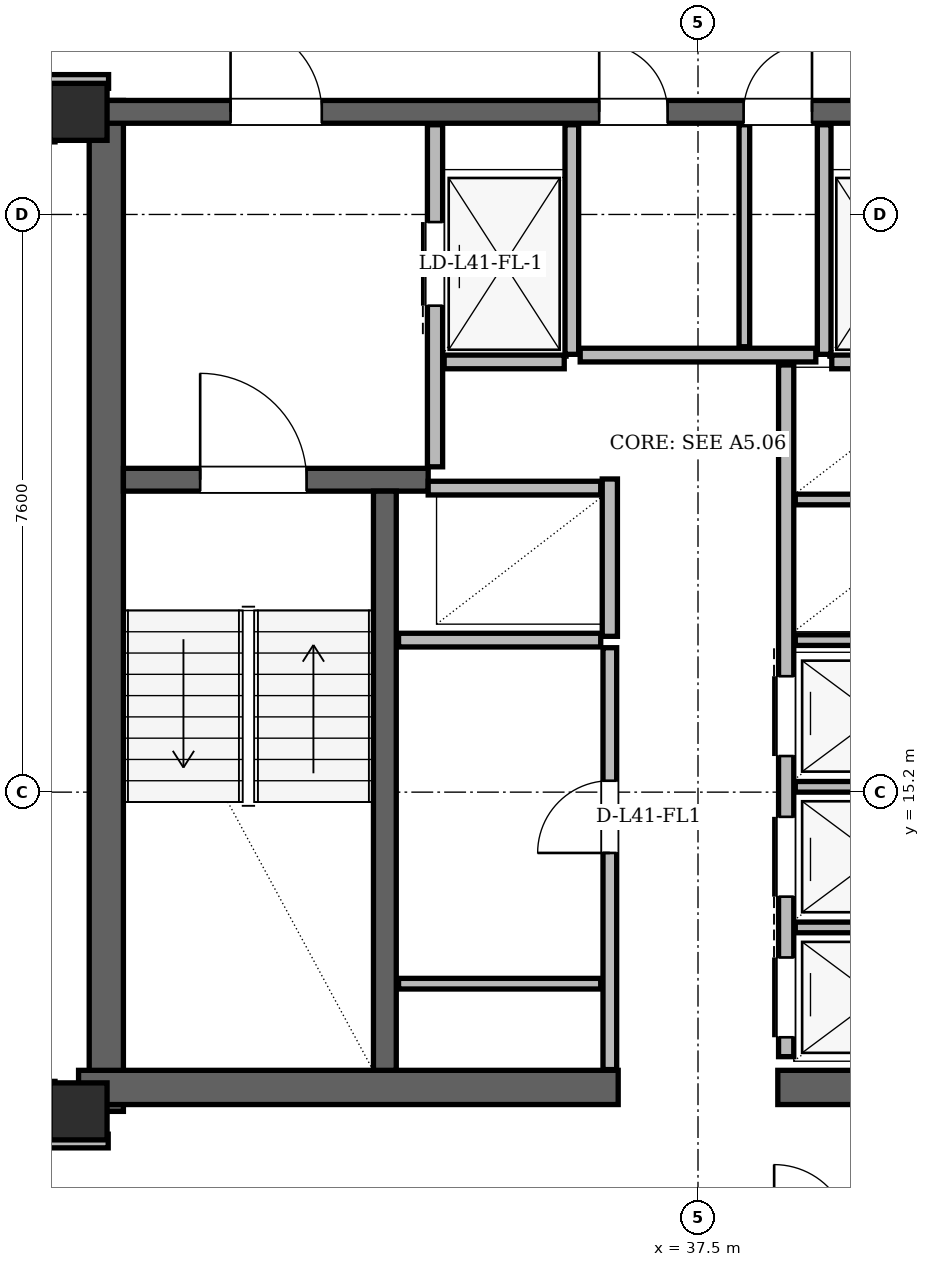
"""IFC4 building model, lengths in metres.
Left out: names, types, materials, properties, quantities, classifications, styles, units other than length and angle.
Written with IfcOpenShell. Run it as: python <this file> out.ifc"""

import sys

from ifc_helpers import new_model, si_unit, direction, frame, frame_2d, origin, origin_2d, place, context, subcontext, project, spatial, rectangle, hollow_rectangle, extrude, element, fill, save


model = new_model("IFC4")
c1 = context("Model", 3, precision=1e-05, world=origin(), true_north=direction((0.0, 1.0)))
c2 = subcontext(c1, "Body", "Model", "MODEL_VIEW")
j1 = project(units=[si_unit("LENGTHUNIT", "METRE"), si_unit("PLANEANGLEUNIT", "RADIAN")], contexts=[c1])
p1 = place(None, origin())
s1 = spatial("IfcSite", under=j1, at=p1, CompositionType="ELEMENT")
p2 = place(p1, origin())
s2 = spatial("IfcBuilding", under=s1, at=p2, CompositionType="ELEMENT")
p3 = place(p2, frame((0.0, 0.0, 156.6)))
s3 = spatial("IfcBuildingStorey", under=s2, at=p3, CompositionType="ELEMENT", Elevation=156.6)
for number, where, z_axis, x_axis in (
    (1, (29.35, 11.0, 0.0), (0.0, 0.0, 1.0), (1.0, 0.0, 0.0)),
    (2, (29.35, 24.15, 0.0), (0.0, 0.0, 1.0), (1.0, 0.0, 0.0)),
):
    element("IfcColumn", number, at=place(p3, frame(where, z_axis=z_axis, x_axis=x_axis)), inside=s3, PredefinedType="COLUMN", context=c2, shape_type="SweptSolid", body=[
        extrude(hollow_rectangle(XDim=0.75, YDim=0.75, WallThickness=0.06, at=origin_2d()), origin(), (0.0, 0.0, 1.0), 3.6),
    ])
p4 = place(p3, frame((29.715, 11.0, 0.0), z_axis=(0.0, 0.0, 1.0), x_axis=(0.0, 1.0, 0.0)))
e3 = element("IfcWall", 3, at=p4, inside=s3, PredefinedType="SHEAR", context=c2, shape_type="SweptSolid", body=[
    extrude(rectangle(XDim=13.3, YDim=0.45, at=frame_2d((6.65, 0.0))), origin(), (0.0, 0.0, 1.0), 3.38),
])
for number, where, z_axis, x_axis in (
    (4, (29.35, 11.315, 0.0), (0.0, 0.0, 1.0), (1.0, 0.0, 0.0)),
    (5, (38.55, 11.315, 0.0), (0.0, 0.0, 1.0), (1.0, 0.0, 0.0)),
):
    element("IfcWall", number, at=place(p3, frame(where, z_axis=z_axis, x_axis=x_axis)), inside=s3, PredefinedType="SHEAR", context=c2, shape_type="SweptSolid", body=[
        extrude(rectangle(XDim=7.1, YDim=0.45, at=frame_2d((3.55, 0.0))), origin(), (0.0, 0.0, 1.0), 3.38),
    ])
p5 = place(p3, frame((29.65, 24.15, 0.0), z_axis=(0.0, 0.0, 1.0), x_axis=(1.0, 0.0, 0.0)))
e6 = element("IfcWall", 6, at=p5, inside=s3, PredefinedType="SHEAR", context=c2, shape_type="SweptSolid", body=[
    extrude(rectangle(XDim=15.7, YDim=0.3, at=frame_2d((7.85, 0.0))), origin(), (0.0, 0.0, 1.0), 3.38),
])
p6 = place(p5, frame((1.7, 0.0, 0.0)))
e7 = element("IfcOpeningElement", 7, at=p6, cuts=e6, PredefinedType="OPENING", context=c2, shape_type="SweptSolid", body=[
    extrude(rectangle(XDim=1.2, YDim=2.2, at=frame_2d((0.6, 1.1))), frame((0.0, 0.15, 0.0), z_axis=(0.0, -1.0, 0.0), x_axis=(1.0, 0.0, 0.0)), (0.0, 0.0, 1.0), 0.3),
])
p7 = place(p5, frame((12.8, 0.0, 0.0)))
e8 = element("IfcOpeningElement", 8, at=p7, cuts=e6, PredefinedType="OPENING", context=c2, shape_type="SweptSolid", body=[
    extrude(rectangle(XDim=1.2, YDim=2.2, at=frame_2d((0.6, 1.1))), frame((0.0, 0.15, 0.0), z_axis=(0.0, -1.0, 0.0), x_axis=(1.0, 0.0, 0.0)), (0.0, 0.0, 1.0), 0.3),
])
p8 = place(p5, frame((6.55, 0.0, 0.0)))
e9 = element("IfcOpeningElement", 9, at=p8, cuts=e6, PredefinedType="OPENING", context=c2, shape_type="SweptSolid", body=[
    extrude(rectangle(XDim=0.9, YDim=2.05, at=frame_2d((0.45, 1.025))), frame((0.0, 0.15, 0.0), z_axis=(0.0, -1.0, 0.0), x_axis=(1.0, 0.0, 0.0)), (0.0, 0.0, 1.0), 0.3),
])
p9 = place(p5, frame((8.45, 0.0, 0.0)))
e10 = element("IfcOpeningElement", 10, at=p9, cuts=e6, PredefinedType="OPENING", context=c2, shape_type="SweptSolid", body=[
    extrude(rectangle(XDim=0.9, YDim=2.05, at=frame_2d((0.45, 1.025))), frame((0.0, 0.15, 0.0), z_axis=(0.0, -1.0, 0.0), x_axis=(1.0, 0.0, 0.0)), (0.0, 0.0, 1.0), 0.3),
])
p10 = place(p3, frame((29.94, 19.31, 0.0), z_axis=(0.0, 0.0, 1.0), x_axis=(1.0, 0.0, 0.0)))
e11 = element("IfcWall", 11, at=p10, inside=s3, PredefinedType="SHEAR", context=c2, shape_type="SweptSolid", body=[
    extrude(rectangle(XDim=4.01, YDim=0.3, at=frame_2d((2.005, 0.0))), origin(), (0.0, 0.0, 1.0), 3.38),
])
p11 = place(p10, frame((1.01, 0.0, 0.0)))
e12 = element("IfcOpeningElement", 12, at=p11, cuts=e11, PredefinedType="OPENING", context=c2, shape_type="SweptSolid", body=[
    extrude(rectangle(XDim=1.4, YDim=2.2, at=frame_2d((0.7, 1.1))), frame((0.0, 0.15, 0.0), z_axis=(0.0, -1.0, 0.0), x_axis=(1.0, 0.0, 0.0)), (0.0, 0.0, 1.0), 0.3),
])
p12 = place(p3, frame((33.38, 11.54, 0.0), z_axis=(0.0, 0.0, 1.0), x_axis=(0.0, 1.0, 0.0)))
e13 = element("IfcWall", 13, at=p12, inside=s3, PredefinedType="SHEAR", context=c2, shape_type="SweptSolid", body=[
    extrude(rectangle(XDim=7.62, YDim=0.3, at=frame_2d((3.81, 0.0))), origin(), (0.0, 0.0, 1.0), 3.38),
])
p13 = place(p3, frame((32.901, 43.313, 0.0), z_axis=(0.0, 0.0, 1.0), x_axis=(-0.499998839087, -0.866026074037, 0.0)))
e14 = element("IfcWall", 14, at=p13, inside=s3, PredefinedType="SOLIDWALL", context=c2, shape_type="SweptSolid", body=[
    extrude(rectangle(XDim=35.606, YDim=0.34, at=frame_2d((17.803, 0.0))), origin(), (0.0, 0.0, 1.0), 2.6),
])
p14 = place(p13, frame((8.034, 0.0, 0.0)))
e15 = element("IfcOpeningElement", 15, at=p14, cuts=e14, PredefinedType="OPENING", context=c2, shape_type="SweptSolid", body=[
    extrude(rectangle(XDim=1.5, YDim=2.2, at=frame_2d((0.75, 1.1))), frame((0.0, 0.17, 0.0), z_axis=(0.0, -1.0, 0.0), x_axis=(1.0, 0.0, 0.0)), (0.0, 0.0, 1.0), 0.34),
])
p15 = place(p13, frame((30.887, 0.0, 0.0)))
e16 = element("IfcOpeningElement", 16, at=p15, cuts=e14, PredefinedType="OPENING", context=c2, shape_type="SweptSolid", body=[
    extrude(rectangle(XDim=1.5, YDim=2.2, at=frame_2d((0.75, 1.1))), frame((0.0, 0.17, 0.0), z_axis=(0.0, -1.0, 0.0), x_axis=(1.0, 0.0, 0.0)), (0.0, 0.0, 1.0), 0.34),
])
p16 = place(p13, frame((33.096, 0.0, 0.85)))
e17 = element("IfcOpeningElement", 17, at=p16, cuts=e14, PredefinedType="OPENING", context=c2, shape_type="SweptSolid", body=[
    extrude(rectangle(XDim=1.2, YDim=1.48, at=frame_2d((0.6, 0.74))), frame((0.0, 0.17, 0.0), z_axis=(0.0, -1.0, 0.0), x_axis=(1.0, 0.0, 0.0)), (0.0, 0.0, 1.0), 0.34),
])
p17 = place(p13, frame((13.168, 0.0, 0.85)))
e18 = element("IfcOpeningElement", 18, at=p17, cuts=e14, PredefinedType="OPENING", context=c2, shape_type="SweptSolid", body=[
    extrude(rectangle(XDim=1.2, YDim=1.48, at=frame_2d((0.6, 0.74))), frame((0.0, 0.17, 0.0), z_axis=(0.0, -1.0, 0.0), x_axis=(1.0, 0.0, 0.0)), (0.0, 0.0, 1.0), 0.34),
])
p18 = place(p13, frame((20.876, 0.0, 0.85)))
e19 = element("IfcOpeningElement", 19, at=p18, cuts=e14, PredefinedType="OPENING", context=c2, shape_type="SweptSolid", body=[
    extrude(rectangle(XDim=2.8, YDim=1.64, at=frame_2d((1.4, 0.82))), frame((0.0, 0.17, 0.0), z_axis=(0.0, -1.0, 0.0), x_axis=(1.0, 0.0, 0.0)), (0.0, 0.0, 1.0), 0.34),
])
p19 = place(p13, frame((2.906, 0.0, 0.85)))
e20 = element("IfcOpeningElement", 20, at=p19, cuts=e14, PredefinedType="OPENING", context=c2, shape_type="SweptSolid", body=[
    extrude(rectangle(XDim=1.6, YDim=1.64, at=frame_2d((0.8, 0.82))), frame((0.0, 0.17, 0.0), z_axis=(0.0, -1.0, 0.0), x_axis=(1.0, 0.0, 0.0)), (0.0, 0.0, 1.0), 0.34),
])
p20 = place(p3, frame((34.04, 19.48, 0.0), z_axis=(0.0, 0.0, 1.0), x_axis=(0.0, 1.0, 0.0)))
e21 = element("IfcWall", 21, at=p20, inside=s3, PredefinedType="PARTITIONING", context=c2, shape_type="SweptSolid", body=[
    extrude(rectangle(XDim=4.5, YDim=0.2, at=frame_2d((2.25, 0.0))), origin(), (0.0, 0.0, 1.0), 2.42),
])
p21 = place(p20, frame((2.12, 0.0, 0.0)))
e22 = element("IfcOpeningElement", 22, at=p21, cuts=e21, PredefinedType="OPENING", context=c2, shape_type="SweptSolid", body=[
    extrude(rectangle(XDim=1.1, YDim=2.2, at=frame_2d((0.55, 1.1))), frame((0.0, 0.1, 0.0), z_axis=(0.0, -1.0, 0.0), x_axis=(1.0, 0.0, 0.0)), (0.0, 0.0, 1.0), 0.2),
])
p22 = place(p3, frame((35.84, 20.96, 0.0), z_axis=(0.0, 0.0, 1.0), x_axis=(0.0, 1.0, 0.0)))
e23 = element("IfcWall", 23, at=p22, inside=s3, PredefinedType="PARTITIONING", context=c2, shape_type="SweptSolid", body=[
    extrude(rectangle(XDim=3.02, YDim=0.18, at=frame_2d((1.51, 0.0))), origin(), (0.0, 0.0, 1.0), 2.42),
])
p23 = place(p3, frame((34.16, 20.86, 0.0), z_axis=(0.0, 0.0, 1.0), x_axis=(1.0, 0.0, 0.0)))
e24 = element("IfcWall", 24, at=p23, inside=s3, PredefinedType="PARTITIONING", context=c2, shape_type="SweptSolid", body=[
    extrude(rectangle(XDim=1.58, YDim=0.18, at=frame_2d((0.79, 0.0))), origin(), (0.0, 0.0, 1.0), 3.38),
])
p24 = place(p3, frame((39.16, 20.96, 0.0), z_axis=(0.0, 0.0, 1.0), x_axis=(0.0, 1.0, 0.0)))
e25 = element("IfcWall", 25, at=p24, inside=s3, PredefinedType="PARTITIONING", context=c2, shape_type="SweptSolid", body=[
    extrude(rectangle(XDim=3.02, YDim=0.18, at=frame_2d((1.51, 0.0))), origin(), (0.0, 0.0, 1.0), 2.42),
])
p25 = place(p3, frame((39.26, 20.86, 0.0), z_axis=(0.0, 0.0, 1.0), x_axis=(1.0, 0.0, 0.0)))
e26 = element("IfcWall", 26, at=p25, inside=s3, PredefinedType="PARTITIONING", context=c2, shape_type="SweptSolid", body=[
    extrude(rectangle(XDim=1.58, YDim=0.18, at=frame_2d((0.79, 0.0))), origin(), (0.0, 0.0, 1.0), 3.38),
])
p26 = place(p3, frame((36.34, 17.25, 0.0), z_axis=(0.0, 0.0, 1.0), x_axis=(0.0, 1.0, 0.0)))
e27 = element("IfcWall", 27, at=p26, inside=s3, PredefinedType="PARTITIONING", context=c2, shape_type="SweptSolid", body=[
    extrude(rectangle(XDim=2.07, YDim=0.2, at=frame_2d((1.035, 0.0))), origin(), (0.0, 0.0, 1.0), 3.38),
])
p27 = place(p3, frame((33.95, 19.2, 0.0), z_axis=(0.0, 0.0, 1.0), x_axis=(1.0, 0.0, 0.0)))
e28 = element("IfcWall", 28, at=p27, inside=s3, PredefinedType="PARTITIONING", context=c2, shape_type="SweptSolid", body=[
    extrude(rectangle(XDim=2.27, YDim=0.18, at=frame_2d((1.135, 0.0))), origin(), (0.0, 0.0, 1.0), 3.38),
])
p28 = place(p3, frame((33.56, 17.2, 0.0), z_axis=(0.0, 0.0, 1.0), x_axis=(1.0, 0.0, 0.0)))
e29 = element("IfcWall", 29, at=p28, inside=s3, PredefinedType="PARTITIONING", context=c2, shape_type="SweptSolid", body=[
    extrude(rectangle(XDim=2.66, YDim=0.18, at=frame_2d((1.33, 0.0))), origin(), (0.0, 0.0, 1.0), 3.38),
])
p29 = place(p3, frame((36.34, 11.55, 0.0), z_axis=(0.0, 0.0, 1.0), x_axis=(0.0, 1.0, 0.0)))
e30 = element("IfcWall", 30, at=p29, inside=s3, PredefinedType="PARTITIONING", context=c2, shape_type="SweptSolid", body=[
    extrude(rectangle(XDim=5.55, YDim=0.18, at=frame_2d((2.775, 0.0))), origin(), (0.0, 0.0, 1.0), 3.38),
])
p30 = place(p29, frame((2.85, 0.0, 0.0)))
e31 = element("IfcOpeningElement", 31, at=p30, cuts=e30, PredefinedType="OPENING", context=c2, shape_type="SweptSolid", body=[
    extrude(rectangle(XDim=0.95, YDim=2.1, at=frame_2d((0.475, 1.05))), frame((0.0, 0.09, 0.0), z_axis=(0.0, -1.0, 0.0), x_axis=(1.0, 0.0, 0.0)), (0.0, 0.0, 1.0), 0.18),
])
p31 = place(p3, frame((33.56, 12.68, 0.0), z_axis=(0.0, 0.0, 1.0), x_axis=(1.0, 0.0, 0.0)))
e32 = element("IfcWall", 32, at=p31, inside=s3, PredefinedType="PARTITIONING", context=c2, shape_type="SweptSolid", body=[
    extrude(rectangle(XDim=2.66, YDim=0.14, at=frame_2d((1.33, 0.0))), origin(), (0.0, 0.0, 1.0), 3.38),
])
p32 = place(p3, frame((38.66, 11.72, 0.0), z_axis=(0.0, 0.0, 1.0), x_axis=(0.0, 1.0, 0.0)))
e33 = element("IfcWall", 33, at=p32, inside=s3, PredefinedType="PARTITIONING", context=c2, shape_type="SweptSolid", body=[
    extrude(rectangle(XDim=9.1, YDim=0.2, at=frame_2d((4.55, 0.0))), origin(), (0.0, 0.0, 1.0), 3.38),
])
p33 = place(p32, frame((0.255, 0.0, 0.0)))
e34 = element("IfcOpeningElement", 34, at=p33, cuts=e33, PredefinedType="OPENING", context=c2, shape_type="SweptSolid", body=[
    extrude(rectangle(XDim=1.05, YDim=2.15, at=frame_2d((0.525, 1.075))), frame((0.0, 0.1, 0.0), z_axis=(0.0, -1.0, 0.0), x_axis=(1.0, 0.0, 0.0)), (0.0, 0.0, 1.0), 0.2),
])
p34 = place(p32, frame((2.105, 0.0, 0.0)))
e35 = element("IfcOpeningElement", 35, at=p34, cuts=e33, PredefinedType="OPENING", context=c2, shape_type="SweptSolid", body=[
    extrude(rectangle(XDim=1.05, YDim=2.15, at=frame_2d((0.525, 1.075))), frame((0.0, 0.1, 0.0), z_axis=(0.0, -1.0, 0.0), x_axis=(1.0, 0.0, 0.0)), (0.0, 0.0, 1.0), 0.2),
])
p35 = place(p32, frame((3.955, 0.0, 0.0)))
e36 = element("IfcOpeningElement", 36, at=p35, cuts=e33, PredefinedType="OPENING", context=c2, shape_type="SweptSolid", body=[
    extrude(rectangle(XDim=1.05, YDim=2.15, at=frame_2d((0.525, 1.075))), frame((0.0, 0.1, 0.0), z_axis=(0.0, -1.0, 0.0), x_axis=(1.0, 0.0, 0.0)), (0.0, 0.0, 1.0), 0.2),
])
for number, where, z_axis, x_axis in (
    (37, (38.78, 13.42, 0.0), (0.0, 0.0, 1.0), (1.0, 0.0, 0.0)),
    (38, (38.78, 15.27, 0.0), (0.0, 0.0, 1.0), (1.0, 0.0, 0.0)),
    (39, (38.78, 17.2, 0.0), (0.0, 0.0, 1.0), (1.0, 0.0, 0.0)),
    (40, (38.78, 19.05, 0.0), (0.0, 0.0, 1.0), (1.0, 0.0, 0.0)),
):
    element("IfcWall", number, at=place(p3, frame(where, z_axis=z_axis, x_axis=x_axis)), inside=s3, PredefinedType="PARTITIONING", context=c2, shape_type="SweptSolid", body=[
        extrude(rectangle(XDim=2.66, YDim=0.14, at=frame_2d((1.33, 0.0))), origin(), (0.0, 0.0, 1.0), 3.38),
    ])
p36 = place(p3, frame((35.95, 20.95, 0.0), z_axis=(0.0, 0.0, 1.0), x_axis=(1.0, 0.0, 0.0)))
e41 = element("IfcWall", 41, at=p36, inside=s3, PredefinedType="PARTITIONING", context=c2, shape_type="SweptSolid", body=[
    extrude(rectangle(XDim=3.1, YDim=0.18, at=frame_2d((1.55, 0.0))), origin(), (0.0, 0.0, 1.0), 3.38),
])
p37 = place(p3, frame((38.11, 21.06, 0.0), z_axis=(0.0, 0.0, 1.0), x_axis=(0.0, 1.0, 0.0)))
e42 = element("IfcWall", 42, at=p37, inside=s3, PredefinedType="PARTITIONING", context=c2, shape_type="SweptSolid", body=[
    extrude(rectangle(XDim=2.92, YDim=0.14, at=frame_2d((1.46, 0.0))), origin(), (0.0, 0.0, 1.0), 2.42),
])
p38 = place(p3, frame((28.96, 10.61, 0.0), z_axis=(0.0, 0.0, 1.0), x_axis=(1.0, 0.0, 0.0)))
e43 = element("IfcWall", 43, at=p38, inside=s3, PredefinedType="PARTITIONING", context=c2, shape_type="SweptSolid", body=[
    extrude(rectangle(XDim=0.78, YDim=0.18, at=frame_2d((0.39, 0.0))), origin(), (0.0, 0.0, 1.0), 3.38),
])
p39 = place(p3, frame((28.955, 24.55, 0.0), z_axis=(0.0, 0.0, 1.0), x_axis=(1.0, 0.0, 0.0)))
e44 = element("IfcWall", 44, at=p39, inside=s3, PredefinedType="PARTITIONING", context=c2, shape_type="SweptSolid", body=[
    extrude(rectangle(XDim=0.79, YDim=0.18, at=frame_2d((0.395, 0.0))), origin(), (0.0, 0.0, 1.0), 2.842),
])
p40 = place(p3, frame((28.95, 10.95, 0.0), z_axis=(0.0, 0.0, 1.0), x_axis=(0.0, 1.0, 0.0)))
e45 = element("IfcWall", 45, at=p40, inside=s3, PredefinedType="PARTITIONING", context=c2, shape_type="SweptSolid", body=[
    extrude(rectangle(XDim=0.445, YDim=0.18, at=frame_2d((0.223, 0.0))), origin(), (0.0, 0.0, 1.0), 2.842),
])
p41 = place(p3, frame((28.95, 23.755, 0.0), z_axis=(0.0, 0.0, 1.0), x_axis=(0.0, 1.0, 0.0)))
e46 = element("IfcWall", 46, at=p41, inside=s3, PredefinedType="PARTITIONING", context=c2, shape_type="SweptSolid", body=[
    extrude(rectangle(XDim=0.565, YDim=0.18, at=frame_2d((0.283, 0.0))), origin(), (0.0, 0.0, 1.0), 3.38),
])
p42 = place(p30, origin())
e47 = element("IfcDoor", 47, at=p42, inside=s3, OperationType="SINGLE_SWING_LEFT", PredefinedType="DOOR", context=c2, shape_type="SweptSolid", body=[
    extrude(rectangle(XDim=0.95, YDim=2.1, at=frame_2d((0.475, 1.05))), frame((0.0, 0.025, 0.0), z_axis=(0.0, -1.0, 0.0), x_axis=(1.0, 0.0, 0.0)), (0.0, 0.0, 1.0), 0.05),
])
fill(e31, e47)
p43 = place(p21, origin())
e48 = element("IfcDoor", 48, at=p43, inside=s3, OperationType="SLIDING_TO_LEFT", PredefinedType="DOOR", context=c2, shape_type="SweptSolid", body=[
    extrude(rectangle(XDim=1.1, YDim=2.2, at=frame_2d((0.55, 1.1))), frame((0.0, 0.025, 0.0), z_axis=(0.0, -1.0, 0.0), x_axis=(1.0, 0.0, 0.0)), (0.0, 0.0, 1.0), 0.05),
])
fill(e22, e48)
p44 = place(p33, origin())
e49 = element("IfcDoor", 49, at=p44, inside=s3, OperationType="SLIDING_TO_RIGHT", PredefinedType="DOOR", context=c2, shape_type="SweptSolid", body=[
    extrude(rectangle(XDim=1.05, YDim=2.15, at=frame_2d((0.525, 1.075))), frame((0.0, 0.025, 0.0), z_axis=(0.0, -1.0, 0.0), x_axis=(1.0, 0.0, 0.0)), (0.0, 0.0, 1.0), 0.05),
])
fill(e34, e49)
p45 = place(p34, origin())
e50 = element("IfcDoor", 50, at=p45, inside=s3, OperationType="SLIDING_TO_LEFT", PredefinedType="DOOR", context=c2, shape_type="SweptSolid", body=[
    extrude(rectangle(XDim=1.05, YDim=2.15, at=frame_2d((0.525, 1.075))), frame((0.0, 0.025, 0.0), z_axis=(0.0, -1.0, 0.0), x_axis=(1.0, 0.0, 0.0)), (0.0, 0.0, 1.0), 0.05),
])
fill(e35, e50)
p46 = place(p35, origin())
e51 = element("IfcDoor", 51, at=p46, inside=s3, OperationType="SLIDING_TO_RIGHT", PredefinedType="DOOR", context=c2, shape_type="SweptSolid", body=[
    extrude(rectangle(XDim=1.05, YDim=2.15, at=frame_2d((0.525, 1.075))), frame((0.0, 0.025, 0.0), z_axis=(0.0, -1.0, 0.0), x_axis=(1.0, 0.0, 0.0)), (0.0, 0.0, 1.0), 0.05),
])
fill(e36, e51)
p47 = place(p11, origin())
e52 = element("IfcDoor", 52, at=p47, inside=s3, OperationType="SINGLE_SWING_LEFT", PredefinedType="DOOR", context=c2, shape_type="SweptSolid", body=[
    extrude(rectangle(XDim=1.4, YDim=2.2, at=frame_2d((0.7, 1.1))), frame((0.0, 0.025, 0.0), z_axis=(0.0, -1.0, 0.0), x_axis=(1.0, 0.0, 0.0)), (0.0, 0.0, 1.0), 0.05),
])
fill(e12, e52)
p48 = place(p6, origin())
e53 = element("IfcDoor", 53, at=p48, inside=s3, OperationType="SINGLE_SWING_LEFT", PredefinedType="DOOR", context=c2, shape_type="SweptSolid", body=[
    extrude(rectangle(XDim=1.2, YDim=2.2, at=frame_2d((0.6, 1.1))), frame((0.0, 0.025, 0.0), z_axis=(0.0, -1.0, 0.0), x_axis=(1.0, 0.0, 0.0)), (0.0, 0.0, 1.0), 0.05),
])
fill(e7, e53)
p49 = place(p8, origin())
e54 = element("IfcDoor", 54, at=p49, inside=s3, OperationType="SINGLE_SWING_LEFT", PredefinedType="DOOR", context=c2, shape_type="SweptSolid", body=[
    extrude(rectangle(XDim=0.9, YDim=2.05, at=frame_2d((0.45, 1.025))), frame((0.0, 0.025, 0.0), z_axis=(0.0, -1.0, 0.0), x_axis=(1.0, 0.0, 0.0)), (0.0, 0.0, 1.0), 0.05),
])
fill(e9, e54)
p50 = place(p9, origin())
e55 = element("IfcDoor", 55, at=p50, inside=s3, OperationType="SINGLE_SWING_RIGHT", PredefinedType="DOOR", context=c2, shape_type="SweptSolid", body=[
    extrude(rectangle(XDim=0.9, YDim=2.05, at=frame_2d((0.45, 1.025))), frame((0.0, 0.025, 0.0), z_axis=(0.0, -1.0, 0.0), x_axis=(1.0, 0.0, 0.0)), (0.0, 0.0, 1.0), 0.05),
])
fill(e10, e55)
save(model, sys.argv[1])
